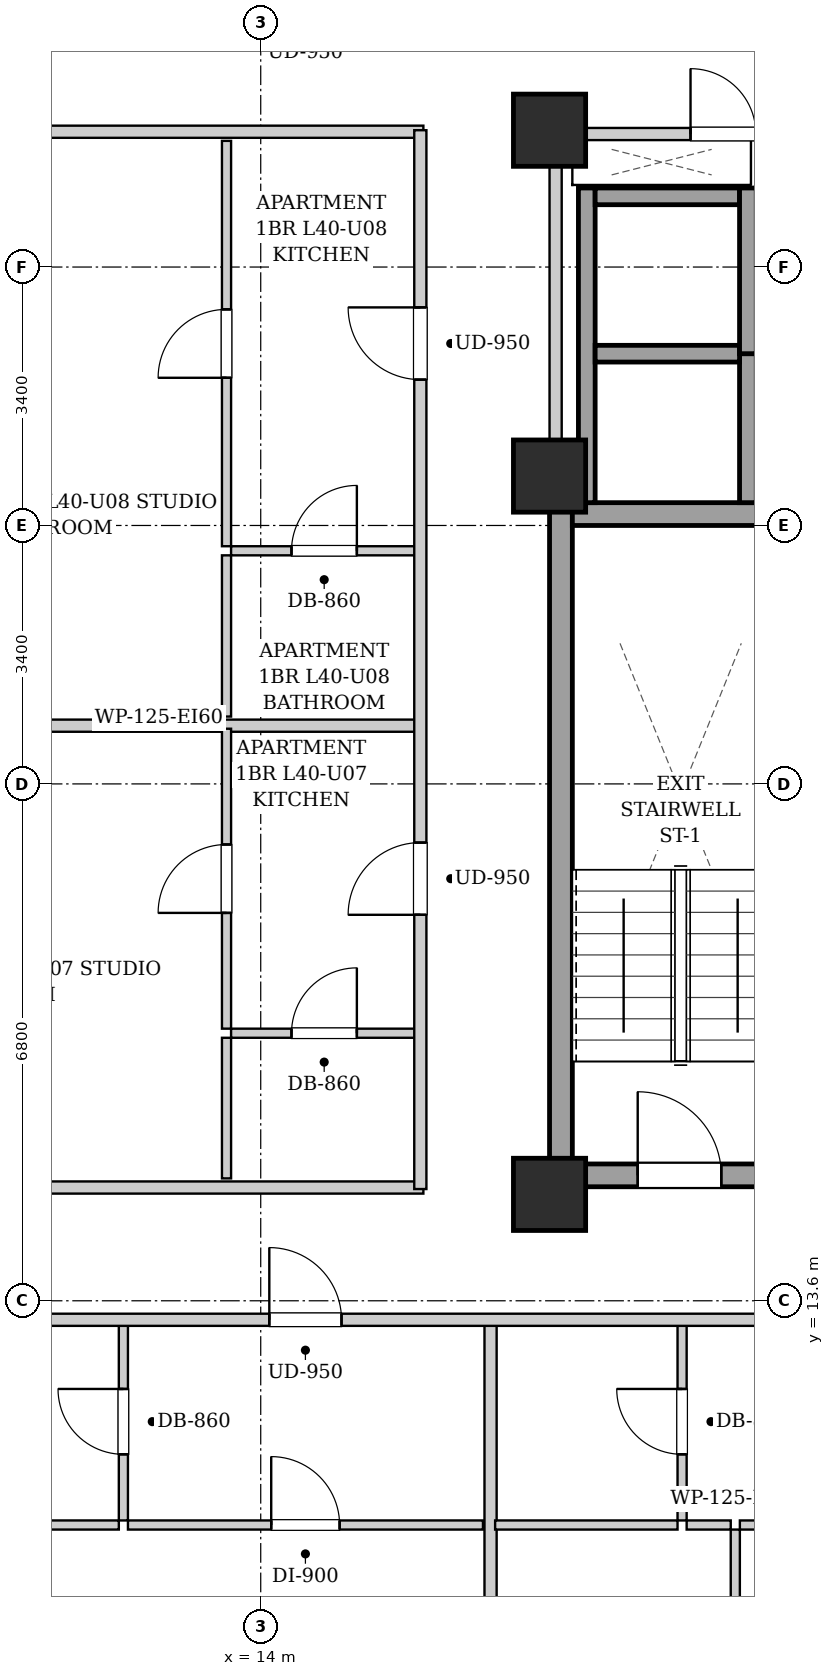
"""IFC4 building model, lengths in metres.
Left out: names, types, materials, properties, quantities, classifications, styles, units other than length and angle.
Written with IfcOpenShell. Run it as: python <this file> out.ifc"""

import sys

from ifc_helpers import new_model, si_unit, direction, frame, frame_2d, origin, origin_2d, place, context, subcontext, project, spatial, rectangle, extrude, element, fill, save


model = new_model("IFC4")
c1 = context("Model", 3, precision=1e-05, world=origin(), true_north=direction((0.0, 1.0)))
c2 = subcontext(c1, "Body", "Model", "MODEL_VIEW")
j1 = project(units=[si_unit("LENGTHUNIT", "METRE"), si_unit("PLANEANGLEUNIT", "RADIAN")], contexts=[c1])
p1 = place(None, origin())
s1 = spatial("IfcSite", under=j1, at=p1, CompositionType="ELEMENT")
p2 = place(p1, origin())
s2 = spatial("IfcBuilding", under=s1, at=p2, CompositionType="ELEMENT")
p3 = place(p2, frame((0.0, 0.0, 140.65)))
s3 = spatial("IfcBuildingStorey", under=s2, at=p3, CompositionType="ELEMENT", Elevation=140.65)
for number, where, z_axis, x_axis in (
    (1, (17.8, 15.0, 0.0), (0.0, 0.0, 1.0), (1.0, 0.0, 0.0)),
    (2, (17.8, 29.0, 0.0), (0.0, 0.0, 1.0), (1.0, 0.0, 0.0)),
    (3, (17.8, 24.45, 0.0), (0.0, 0.0, 1.0), (1.0, 0.0, 0.0)),
):
    element("IfcColumn", number, at=place(p3, frame(where, z_axis=z_axis, x_axis=x_axis)), inside=s3, PredefinedType="COLUMN", context=c2, shape_type="SweptSolid", body=[
        extrude(rectangle(XDim=0.95, YDim=0.95, at=origin_2d()), origin(), (0.0, 0.0, 1.0), 3.25),
    ])
p4 = place(p3, frame((17.95, 15.1, 0.0), z_axis=(0.0, 0.0, 1.0), x_axis=(0.0, 1.0, 0.0)))
e4 = element("IfcWall", 4, at=p4, inside=s3, PredefinedType="SHEAR", context=c2, shape_type="SweptSolid", body=[
    extrude(rectangle(XDim=9.0, YDim=0.3, at=frame_2d((4.5, 0.0))), origin(), (0.0, 0.0, 1.0), 2.99),
])
p5 = place(p3, frame((18.1, 23.95, 0.0), z_axis=(0.0, 0.0, 1.0), x_axis=(1.0, 0.0, 0.0)))
e5 = element("IfcWall", 5, at=p5, inside=s3, PredefinedType="SHEAR", context=c2, shape_type="SweptSolid", body=[
    extrude(rectangle(XDim=2.85, YDim=0.3, at=frame_2d((1.425, 0.0))), origin(), (0.0, 0.0, 1.0), 2.99),
])
p6 = place(p3, frame((18.1, 15.25, 0.0), z_axis=(0.0, 0.0, 1.0), x_axis=(1.0, 0.0, 0.0)))
e6 = element("IfcWall", 6, at=p6, inside=s3, PredefinedType="SHEAR", context=c2, shape_type="SweptSolid", body=[
    extrude(rectangle(XDim=2.85, YDim=0.3, at=frame_2d((1.425, 0.0))), origin(), (0.0, 0.0, 1.0), 2.99),
])
p7 = place(p6, frame((0.86, 0.0, 0.0)))
e7 = element("IfcOpeningElement", 7, at=p7, cuts=e6, PredefinedType="OPENING", context=c2, shape_type="SweptSolid", body=[
    extrude(rectangle(XDim=1.1, YDim=2.05, at=frame_2d((0.55, 1.025))), frame((0.0, 0.16, 0.0), z_axis=(0.0, -1.0, 0.0), x_axis=(1.0, 0.0, 0.0)), (0.0, 0.0, 1.0), 0.32),
])
p8 = place(p3, frame((18.29, 24.1, 0.0), z_axis=(0.0, 0.0, 1.0), x_axis=(0.0, 1.0, 0.0)))
e8 = element("IfcWall", 8, at=p8, inside=s3, PredefinedType="SHEAR", context=c2, shape_type="SweptSolid", body=[
    extrude(rectangle(XDim=4.14, YDim=0.22, at=frame_2d((2.07, 0.0))), origin(), (0.0, 0.0, 1.0), 2.99),
])
p9 = place(p3, frame((20.41, 24.1, 0.0), z_axis=(0.0, 0.0, 1.0), x_axis=(0.0, 1.0, 0.0)))
e9 = element("IfcWall", 9, at=p9, inside=s3, PredefinedType="SHEAR", context=c2, shape_type="SweptSolid", body=[
    extrude(rectangle(XDim=1.96, YDim=0.22, at=frame_2d((0.98, 0.0))), origin(), (0.0, 0.0, 1.0), 2.99),
])
for number, where, z_axis, x_axis in (
    (10, (18.4, 26.06, 0.0), (0.0, 0.0, 1.0), (1.0, 0.0, 0.0)),
    (11, (18.4, 28.13, 0.0), (0.0, 0.0, 1.0), (1.0, 0.0, 0.0)),
):
    element("IfcWall", number, at=place(p3, frame(where, z_axis=z_axis, x_axis=x_axis)), inside=s3, PredefinedType="SHEAR", context=c2, shape_type="SweptSolid", body=[
        extrude(rectangle(XDim=1.9, YDim=0.22, at=frame_2d((0.95, 0.0))), origin(), (0.0, 0.0, 1.0), 2.99),
    ])
p10 = place(p3, frame((20.41, 26.06, 0.0), z_axis=(0.0, 0.0, 1.0), x_axis=(0.0, 1.0, 0.0)))
e12 = element("IfcWall", 12, at=p10, inside=s3, PredefinedType="SHEAR", context=c2, shape_type="SweptSolid", body=[
    extrude(rectangle(XDim=2.18, YDim=0.22, at=frame_2d((1.09, 0.0))), origin(), (0.0, 0.0, 1.0), 2.99),
])
p11 = place(p3, frame((17.88, 24.12, 0.0), z_axis=(0.0, 0.0, 1.0), x_axis=(0.0, 1.0, 0.0)))
e13 = element("IfcWall", 13, at=p11, inside=s3, PredefinedType="PARTITIONING", context=c2, shape_type="SweptSolid", body=[
    extrude(rectangle(XDim=4.76, YDim=0.16, at=frame_2d((2.38, 0.0))), origin(), (0.0, 0.0, 1.0), 2.99),
])
p12 = place(p3, frame((17.96, 28.95, 0.0), z_axis=(0.0, 0.0, 1.0), x_axis=(1.0, 0.0, 0.0)))
e14 = element("IfcWall", 14, at=p12, inside=s3, PredefinedType="PARTITIONING", context=c2, shape_type="SweptSolid", body=[
    extrude(rectangle(XDim=4.29, YDim=0.16, at=frame_2d((2.145, 0.0))), origin(), (0.0, 0.0, 1.0), 2.426),
])
p13 = place(p12, frame((1.695, 0.0, 0.0)))
e15 = element("IfcOpeningElement", 15, at=p13, cuts=e14, PredefinedType="OPENING", context=c2, shape_type="SweptSolid", body=[
    extrude(rectangle(XDim=0.86, YDim=2.05, at=frame_2d((0.43, 1.025))), frame((0.0, 0.09, 0.0), z_axis=(0.0, -1.0, 0.0), x_axis=(1.0, 0.0, 0.0)), (0.0, 0.0, 1.0), 0.18),
])
for number, where, z_axis, x_axis in (
    (16, (7.78, 15.09, 0.0), (0.0, 0.0, 1.0), (1.0, 0.0, 0.0)),
    (17, (7.78, 28.98, 0.0), (0.0, 0.0, 1.0), (1.0, 0.0, 0.0)),
):
    element("IfcWall", number, at=place(p3, frame(where, z_axis=z_axis, x_axis=x_axis)), inside=s3, PredefinedType="PARTITIONING", context=c2, shape_type="SweptSolid", body=[
        extrude(rectangle(XDim=8.36, YDim=0.16, at=frame_2d((4.18, 0.0))), origin(), (0.0, 0.0, 1.0), 2.426),
    ])
p14 = place(p3, frame((12.193, 10.71, 0.0), z_axis=(0.0, 0.0, 1.0), x_axis=(0.0, 1.0, 0.0)))
e18 = element("IfcWall", 18, at=p14, inside=s3, PredefinedType="PARTITIONING", context=c2, shape_type="SweptSolid", body=[
    extrude(rectangle(XDim=2.6, YDim=0.12, at=frame_2d((1.3, 0.0))), origin(), (0.0, 0.0, 1.0), 2.99),
])
p15 = place(p14, frame((0.87, 0.0, 0.0)))
e19 = element("IfcOpeningElement", 19, at=p15, cuts=e18, PredefinedType="OPENING", context=c2, shape_type="SweptSolid", body=[
    extrude(rectangle(XDim=0.86, YDim=2.05, at=frame_2d((0.43, 1.025))), frame((0.0, 0.07, 0.0), z_axis=(0.0, -1.0, 0.0), x_axis=(1.0, 0.0, 0.0)), (0.0, 0.0, 1.0), 0.14),
])
p16 = place(p3, frame((10.08, 10.65, 0.0), z_axis=(0.0, 0.0, 1.0), x_axis=(1.0, 0.0, 0.0)))
e20 = element("IfcWall", 20, at=p16, inside=s3, PredefinedType="PARTITIONING", context=c2, shape_type="SweptSolid", body=[
    extrude(rectangle(XDim=2.053, YDim=0.12, at=frame_2d((1.026, 0.0))), origin(), (0.0, 0.0, 1.0), 2.99),
])
p17 = place(p3, frame((12.253, 10.65, 0.0), z_axis=(0.0, 0.0, 1.0), x_axis=(1.0, 0.0, 0.0)))
e21 = element("IfcWall", 21, at=p17, inside=s3, PredefinedType="PARTITIONING", context=c2, shape_type="SweptSolid", body=[
    extrude(rectangle(XDim=4.671, YDim=0.12, at=frame_2d((2.335, 0.0))), origin(), (0.0, 0.0, 1.0), 2.99),
])
p18 = place(p17, frame((1.885, 0.0, 0.0)))
e22 = element("IfcOpeningElement", 22, at=p18, cuts=e21, PredefinedType="OPENING", context=c2, shape_type="SweptSolid", body=[
    extrude(rectangle(XDim=0.9, YDim=2.05, at=frame_2d((0.45, 1.025))), frame((0.0, 0.07, 0.0), z_axis=(0.0, -1.0, 0.0), x_axis=(1.0, 0.0, 0.0)), (0.0, 0.0, 1.0), 0.14),
])
p19 = place(p3, frame((17.024, 6.06, 0.0), z_axis=(0.0, 0.0, 1.0), x_axis=(0.0, 1.0, 0.0)))
e23 = element("IfcWall", 23, at=p19, inside=s3, PredefinedType="PARTITIONING", context=c2, shape_type="SweptSolid", body=[
    extrude(rectangle(XDim=7.25, YDim=0.16, at=frame_2d((3.625, 0.0))), origin(), (0.0, 0.0, 1.0), 2.99),
])
p20 = place(p3, frame((19.544, 10.71, 0.0), z_axis=(0.0, 0.0, 1.0), x_axis=(0.0, 1.0, 0.0)))
e24 = element("IfcWall", 24, at=p20, inside=s3, PredefinedType="PARTITIONING", context=c2, shape_type="SweptSolid", body=[
    extrude(rectangle(XDim=2.6, YDim=0.12, at=frame_2d((1.3, 0.0))), origin(), (0.0, 0.0, 1.0), 2.99),
])
p21 = place(p20, frame((0.87, 0.0, 0.0)))
e25 = element("IfcOpeningElement", 25, at=p21, cuts=e24, PredefinedType="OPENING", context=c2, shape_type="SweptSolid", body=[
    extrude(rectangle(XDim=0.86, YDim=2.05, at=frame_2d((0.43, 1.025))), frame((0.0, 0.07, 0.0), z_axis=(0.0, -1.0, 0.0), x_axis=(1.0, 0.0, 0.0)), (0.0, 0.0, 1.0), 0.14),
])
p22 = place(p3, frame((17.084, 10.65, 0.0), z_axis=(0.0, 0.0, 1.0), x_axis=(1.0, 0.0, 0.0)))
e26 = element("IfcWall", 26, at=p22, inside=s3, PredefinedType="PARTITIONING", context=c2, shape_type="SweptSolid", body=[
    extrude(rectangle(XDim=2.4, YDim=0.12, at=frame_2d((1.2, 0.0))), origin(), (0.0, 0.0, 1.0), 2.99),
])
p23 = place(p3, frame((19.604, 10.65, 0.0), z_axis=(0.0, 0.0, 1.0), x_axis=(1.0, 0.0, 0.0)))
e27 = element("IfcWall", 27, at=p23, inside=s3, PredefinedType="PARTITIONING", context=c2, shape_type="SweptSolid", body=[
    extrude(rectangle(XDim=0.58, YDim=0.12, at=frame_2d((0.29, 0.0))), origin(), (0.0, 0.0, 1.0), 2.99),
])
p24 = place(p3, frame((20.304, 10.65, 0.0), z_axis=(0.0, 0.0, 1.0), x_axis=(1.0, 0.0, 0.0)))
e28 = element("IfcWall", 28, at=p24, inside=s3, PredefinedType="PARTITIONING", context=c2, shape_type="SweptSolid", body=[
    extrude(rectangle(XDim=3.1, YDim=0.12, at=frame_2d((1.55, 0.0))), origin(), (0.0, 0.0, 1.0), 2.99),
])
p25 = place(p24, frame((1.1, 0.0, 0.0)))
e29 = element("IfcOpeningElement", 29, at=p25, cuts=e28, PredefinedType="OPENING", context=c2, shape_type="SweptSolid", body=[
    extrude(rectangle(XDim=0.9, YDim=2.05, at=frame_2d((0.45, 1.025))), frame((0.0, 0.07, 0.0), z_axis=(0.0, -1.0, 0.0), x_axis=(1.0, 0.0, 0.0)), (0.0, 0.0, 1.0), 0.14),
])
p26 = place(p3, frame((20.244, 4.08, 0.0), z_axis=(0.0, 0.0, 1.0), x_axis=(0.0, 1.0, 0.0)))
e30 = element("IfcWall", 30, at=p26, inside=s3, PredefinedType="PARTITIONING", context=c2, shape_type="SweptSolid", body=[
    extrude(rectangle(XDim=6.51, YDim=0.12, at=frame_2d((3.255, 0.0))), origin(), (0.0, 0.0, 1.0), 2.99),
])
p27 = place(p26, frame((2.79, 0.0, 0.0)))
e31 = element("IfcOpeningElement", 31, at=p27, cuts=e30, PredefinedType="OPENING", context=c2, shape_type="SweptSolid", body=[
    extrude(rectangle(XDim=0.9, YDim=2.05, at=frame_2d((0.45, 1.025))), frame((0.0, 0.07, 0.0), z_axis=(0.0, -1.0, 0.0), x_axis=(1.0, 0.0, 0.0)), (0.0, 0.0, 1.0), 0.14),
])
p28 = place(p3, frame((7.78, 21.166, 0.0), z_axis=(0.0, 0.0, 1.0), x_axis=(1.0, 0.0, 0.0)))
e32 = element("IfcWall", 32, at=p28, inside=s3, PredefinedType="PARTITIONING", context=c2, shape_type="SweptSolid", body=[
    extrude(rectangle(XDim=8.28, YDim=0.16, at=frame_2d((4.14, 0.0))), origin(), (0.0, 0.0, 1.0), 2.99),
])
p29 = place(p3, frame((13.61, 17.12, 0.0), z_axis=(0.0, 0.0, 1.0), x_axis=(1.0, 0.0, 0.0)))
e33 = element("IfcWall", 33, at=p29, inside=s3, PredefinedType="PARTITIONING", context=c2, shape_type="SweptSolid", body=[
    extrude(rectangle(XDim=2.45, YDim=0.12, at=frame_2d((1.225, 0.0))), origin(), (0.0, 0.0, 1.0), 2.99),
])
p30 = place(p29, frame((0.795, 0.0, 0.0)))
e34 = element("IfcOpeningElement", 34, at=p30, cuts=e33, PredefinedType="OPENING", context=c2, shape_type="SweptSolid", body=[
    extrude(rectangle(XDim=0.86, YDim=2.05, at=frame_2d((0.43, 1.025))), frame((0.0, 0.07, 0.0), z_axis=(0.0, -1.0, 0.0), x_axis=(1.0, 0.0, 0.0)), (0.0, 0.0, 1.0), 0.14),
])
p31 = place(p3, frame((13.55, 15.21, 0.0), z_axis=(0.0, 0.0, 1.0), x_axis=(0.0, 1.0, 0.0)))
e35 = element("IfcWall", 35, at=p31, inside=s3, PredefinedType="PARTITIONING", context=c2, shape_type="SweptSolid", body=[
    extrude(rectangle(XDim=1.85, YDim=0.12, at=frame_2d((0.925, 0.0))), origin(), (0.0, 0.0, 1.0), 2.99),
])
p32 = place(p3, frame((13.55, 17.18, 0.0), z_axis=(0.0, 0.0, 1.0), x_axis=(0.0, 1.0, 0.0)))
e36 = element("IfcWall", 36, at=p32, inside=s3, PredefinedType="PARTITIONING", context=c2, shape_type="SweptSolid", body=[
    extrude(rectangle(XDim=3.946, YDim=0.12, at=frame_2d((1.973, 0.0))), origin(), (0.0, 0.0, 1.0), 2.99),
])
p33 = place(p32, frame((1.523, 0.0, 0.0)))
e37 = element("IfcOpeningElement", 37, at=p33, cuts=e36, PredefinedType="OPENING", context=c2, shape_type="SweptSolid", body=[
    extrude(rectangle(XDim=0.9, YDim=2.05, at=frame_2d((0.45, 1.025))), frame((0.0, 0.07, 0.0), z_axis=(0.0, -1.0, 0.0), x_axis=(1.0, 0.0, 0.0)), (0.0, 0.0, 1.0), 0.14),
])
p34 = place(p3, frame((13.61, 23.467, 0.0), z_axis=(0.0, 0.0, 1.0), x_axis=(1.0, 0.0, 0.0)))
e38 = element("IfcWall", 38, at=p34, inside=s3, PredefinedType="PARTITIONING", context=c2, shape_type="SweptSolid", body=[
    extrude(rectangle(XDim=2.45, YDim=0.12, at=frame_2d((1.225, 0.0))), origin(), (0.0, 0.0, 1.0), 2.99),
])
p35 = place(p34, frame((0.795, 0.0, 0.0)))
e39 = element("IfcOpeningElement", 39, at=p35, cuts=e38, PredefinedType="OPENING", context=c2, shape_type="SweptSolid", body=[
    extrude(rectangle(XDim=0.86, YDim=2.05, at=frame_2d((0.43, 1.025))), frame((0.0, 0.07, 0.0), z_axis=(0.0, -1.0, 0.0), x_axis=(1.0, 0.0, 0.0)), (0.0, 0.0, 1.0), 0.14),
])
p36 = place(p3, frame((13.55, 21.286, 0.0), z_axis=(0.0, 0.0, 1.0), x_axis=(0.0, 1.0, 0.0)))
e40 = element("IfcWall", 40, at=p36, inside=s3, PredefinedType="PARTITIONING", context=c2, shape_type="SweptSolid", body=[
    extrude(rectangle(XDim=2.121, YDim=0.12, at=frame_2d((1.061, 0.0))), origin(), (0.0, 0.0, 1.0), 2.99),
])
p37 = place(p3, frame((13.55, 23.527, 0.0), z_axis=(0.0, 0.0, 1.0), x_axis=(0.0, 1.0, 0.0)))
e41 = element("IfcWall", 41, at=p37, inside=s3, PredefinedType="PARTITIONING", context=c2, shape_type="SweptSolid", body=[
    extrude(rectangle(XDim=5.333, YDim=0.12, at=frame_2d((2.667, 0.0))), origin(), (0.0, 0.0, 1.0), 2.99),
])
p38 = place(p37, frame((2.216, 0.0, 0.0)))
e42 = element("IfcOpeningElement", 42, at=p38, cuts=e41, PredefinedType="OPENING", context=c2, shape_type="SweptSolid", body=[
    extrude(rectangle(XDim=0.9, YDim=2.05, at=frame_2d((0.45, 1.025))), frame((0.0, 0.07, 0.0), z_axis=(0.0, -1.0, 0.0), x_axis=(1.0, 0.0, 0.0)), (0.0, 0.0, 1.0), 0.14),
])
p39 = place(p3, frame((10.05, 13.35, 0.0), z_axis=(0.0, 0.0, 1.0), x_axis=(1.0, 0.0, 0.0)))
e43 = element("IfcWall", 43, at=p39, inside=s3, PredefinedType="PARTITIONING", context=c2, shape_type="SweptSolid", body=[
    extrude(rectangle(XDim=27.7, YDim=0.16, at=frame_2d((13.85, 0.0))), origin(), (0.0, 0.0, 1.0), 2.99),
])
p40 = place(p39, frame((4.063, 0.0, 0.0)))
e44 = element("IfcOpeningElement", 44, at=p40, cuts=e43, PredefinedType="OPENING", context=c2, shape_type="SweptSolid", body=[
    extrude(rectangle(XDim=0.95, YDim=2.1, at=frame_2d((0.475, 1.05))), frame((0.0, 0.09, 0.0), z_axis=(0.0, -1.0, 0.0), x_axis=(1.0, 0.0, 0.0)), (0.0, 0.0, 1.0), 0.18),
])
p41 = place(p39, frame((11.735, 0.0, 0.0)))
e45 = element("IfcOpeningElement", 45, at=p41, cuts=e43, PredefinedType="OPENING", context=c2, shape_type="SweptSolid", body=[
    extrude(rectangle(XDim=0.95, YDim=2.1, at=frame_2d((0.475, 1.05))), frame((0.0, 0.09, 0.0), z_axis=(0.0, -1.0, 0.0), x_axis=(1.0, 0.0, 0.0)), (0.0, 0.0, 1.0), 0.18),
])
p42 = place(p3, frame((16.1, 15.07, 0.0), z_axis=(0.0, 0.0, 1.0), x_axis=(0.0, 1.0, 0.0)))
e46 = element("IfcWall", 46, at=p42, inside=s3, PredefinedType="PARTITIONING", context=c2, shape_type="SweptSolid", body=[
    extrude(rectangle(XDim=13.93, YDim=0.16, at=frame_2d((6.965, 0.0))), origin(), (0.0, 0.0, 1.0), 2.99),
])
p43 = place(p42, frame((3.608, 0.0, 0.0)))
e47 = element("IfcOpeningElement", 47, at=p43, cuts=e46, PredefinedType="OPENING", context=c2, shape_type="SweptSolid", body=[
    extrude(rectangle(XDim=0.95, YDim=2.1, at=frame_2d((0.475, 1.05))), frame((0.0, 0.09, 0.0), z_axis=(0.0, -1.0, 0.0), x_axis=(1.0, 0.0, 0.0)), (0.0, 0.0, 1.0), 0.18),
])
p44 = place(p42, frame((10.649, 0.0, 0.0)))
e48 = element("IfcOpeningElement", 48, at=p44, cuts=e46, PredefinedType="OPENING", context=c2, shape_type="SweptSolid", body=[
    extrude(rectangle(XDim=0.95, YDim=2.1, at=frame_2d((0.475, 1.05))), frame((0.0, 0.09, 0.0), z_axis=(0.0, -1.0, 0.0), x_axis=(1.0, 0.0, 0.0)), (0.0, 0.0, 1.0), 0.18),
])
p45 = place(p7, origin())
e49 = element("IfcDoor", 49, at=p45, inside=s3, OperationType="SINGLE_SWING_LEFT", PredefinedType="DOOR", context=c2, shape_type="SweptSolid", body=[
    extrude(rectangle(XDim=1.1, YDim=2.05, at=frame_2d((0.55, 1.025))), frame((0.0, 0.025, 0.0), z_axis=(0.0, -1.0, 0.0), x_axis=(1.0, 0.0, 0.0)), (0.0, 0.0, 1.0), 0.05),
])
fill(e7, e49)
p46 = place(p13, origin())
e50 = element("IfcDoor", 50, at=p46, inside=s3, OperationType="SINGLE_SWING_LEFT", PredefinedType="DOOR", context=c2, shape_type="SweptSolid", body=[
    extrude(rectangle(XDim=0.86, YDim=2.05, at=frame_2d((0.43, 1.025))), frame((0.0, 0.025, 0.0), z_axis=(0.0, -1.0, 0.0), x_axis=(1.0, 0.0, 0.0)), (0.0, 0.0, 1.0), 0.05),
])
fill(e15, e50)
p47 = place(p15, origin())
e51 = element("IfcDoor", 51, at=p47, inside=s3, OperationType="SINGLE_SWING_RIGHT", PredefinedType="DOOR", context=c2, shape_type="SweptSolid", body=[
    extrude(rectangle(XDim=0.86, YDim=2.05, at=frame_2d((0.43, 1.025))), frame((0.0, 0.025, 0.0), z_axis=(0.0, -1.0, 0.0), x_axis=(1.0, 0.0, 0.0)), (0.0, 0.0, 1.0), 0.05),
])
fill(e19, e51)
p48 = place(p18, origin())
e52 = element("IfcDoor", 52, at=p48, inside=s3, OperationType="SINGLE_SWING_LEFT", PredefinedType="DOOR", context=c2, shape_type="SweptSolid", body=[
    extrude(rectangle(XDim=0.9, YDim=2.05, at=frame_2d((0.45, 1.025))), frame((0.0, 0.025, 0.0), z_axis=(0.0, -1.0, 0.0), x_axis=(1.0, 0.0, 0.0)), (0.0, 0.0, 1.0), 0.05),
])
fill(e22, e52)
p49 = place(p21, origin())
e53 = element("IfcDoor", 53, at=p49, inside=s3, OperationType="SINGLE_SWING_RIGHT", PredefinedType="DOOR", context=c2, shape_type="SweptSolid", body=[
    extrude(rectangle(XDim=0.86, YDim=2.05, at=frame_2d((0.43, 1.025))), frame((0.0, 0.025, 0.0), z_axis=(0.0, -1.0, 0.0), x_axis=(1.0, 0.0, 0.0)), (0.0, 0.0, 1.0), 0.05),
])
fill(e25, e53)
p50 = place(p30, origin())
e54 = element("IfcDoor", 54, at=p50, inside=s3, OperationType="SINGLE_SWING_RIGHT", PredefinedType="DOOR", context=c2, shape_type="SweptSolid", body=[
    extrude(rectangle(XDim=0.86, YDim=2.05, at=frame_2d((0.43, 1.025))), frame((0.0, 0.025, 0.0), z_axis=(0.0, -1.0, 0.0), x_axis=(1.0, 0.0, 0.0)), (0.0, 0.0, 1.0), 0.05),
])
fill(e34, e54)
p51 = place(p33, origin())
e55 = element("IfcDoor", 55, at=p51, inside=s3, OperationType="SINGLE_SWING_LEFT", PredefinedType="DOOR", context=c2, shape_type="SweptSolid", body=[
    extrude(rectangle(XDim=0.9, YDim=2.05, at=frame_2d((0.45, 1.025))), frame((0.0, 0.025, 0.0), z_axis=(0.0, -1.0, 0.0), x_axis=(1.0, 0.0, 0.0)), (0.0, 0.0, 1.0), 0.05),
])
fill(e37, e55)
p52 = place(p35, origin())
e56 = element("IfcDoor", 56, at=p52, inside=s3, OperationType="SINGLE_SWING_RIGHT", PredefinedType="DOOR", context=c2, shape_type="SweptSolid", body=[
    extrude(rectangle(XDim=0.86, YDim=2.05, at=frame_2d((0.43, 1.025))), frame((0.0, 0.025, 0.0), z_axis=(0.0, -1.0, 0.0), x_axis=(1.0, 0.0, 0.0)), (0.0, 0.0, 1.0), 0.05),
])
fill(e39, e56)
p53 = place(p38, origin())
e57 = element("IfcDoor", 57, at=p53, inside=s3, OperationType="SINGLE_SWING_LEFT", PredefinedType="DOOR", context=c2, shape_type="SweptSolid", body=[
    extrude(rectangle(XDim=0.9, YDim=2.05, at=frame_2d((0.45, 1.025))), frame((0.0, 0.025, 0.0), z_axis=(0.0, -1.0, 0.0), x_axis=(1.0, 0.0, 0.0)), (0.0, 0.0, 1.0), 0.05),
])
fill(e42, e57)
p54 = place(p40, origin())
e58 = element("IfcDoor", 58, at=p54, inside=s3, OperationType="SINGLE_SWING_LEFT", PredefinedType="DOOR", context=c2, shape_type="SweptSolid", body=[
    extrude(rectangle(XDim=0.95, YDim=2.1, at=frame_2d((0.475, 1.05))), frame((0.0, 0.025, 0.0), z_axis=(0.0, -1.0, 0.0), x_axis=(1.0, 0.0, 0.0)), (0.0, 0.0, 1.0), 0.05),
])
fill(e44, e58)
p55 = place(p43, origin())
e59 = element("IfcDoor", 59, at=p55, inside=s3, OperationType="SINGLE_SWING_LEFT", PredefinedType="DOOR", context=c2, shape_type="SweptSolid", body=[
    extrude(rectangle(XDim=0.95, YDim=2.1, at=frame_2d((0.475, 1.05))), frame((0.0, 0.025, 0.0), z_axis=(0.0, -1.0, 0.0), x_axis=(1.0, 0.0, 0.0)), (0.0, 0.0, 1.0), 0.05),
])
fill(e47, e59)
p56 = place(p44, origin())
e60 = element("IfcDoor", 60, at=p56, inside=s3, OperationType="SINGLE_SWING_RIGHT", PredefinedType="DOOR", context=c2, shape_type="SweptSolid", body=[
    extrude(rectangle(XDim=0.95, YDim=2.1, at=frame_2d((0.475, 1.05))), frame((0.0, 0.025, 0.0), z_axis=(0.0, -1.0, 0.0), x_axis=(1.0, 0.0, 0.0)), (0.0, 0.0, 1.0), 0.05),
])
fill(e48, e60)
save(model, sys.argv[1])
